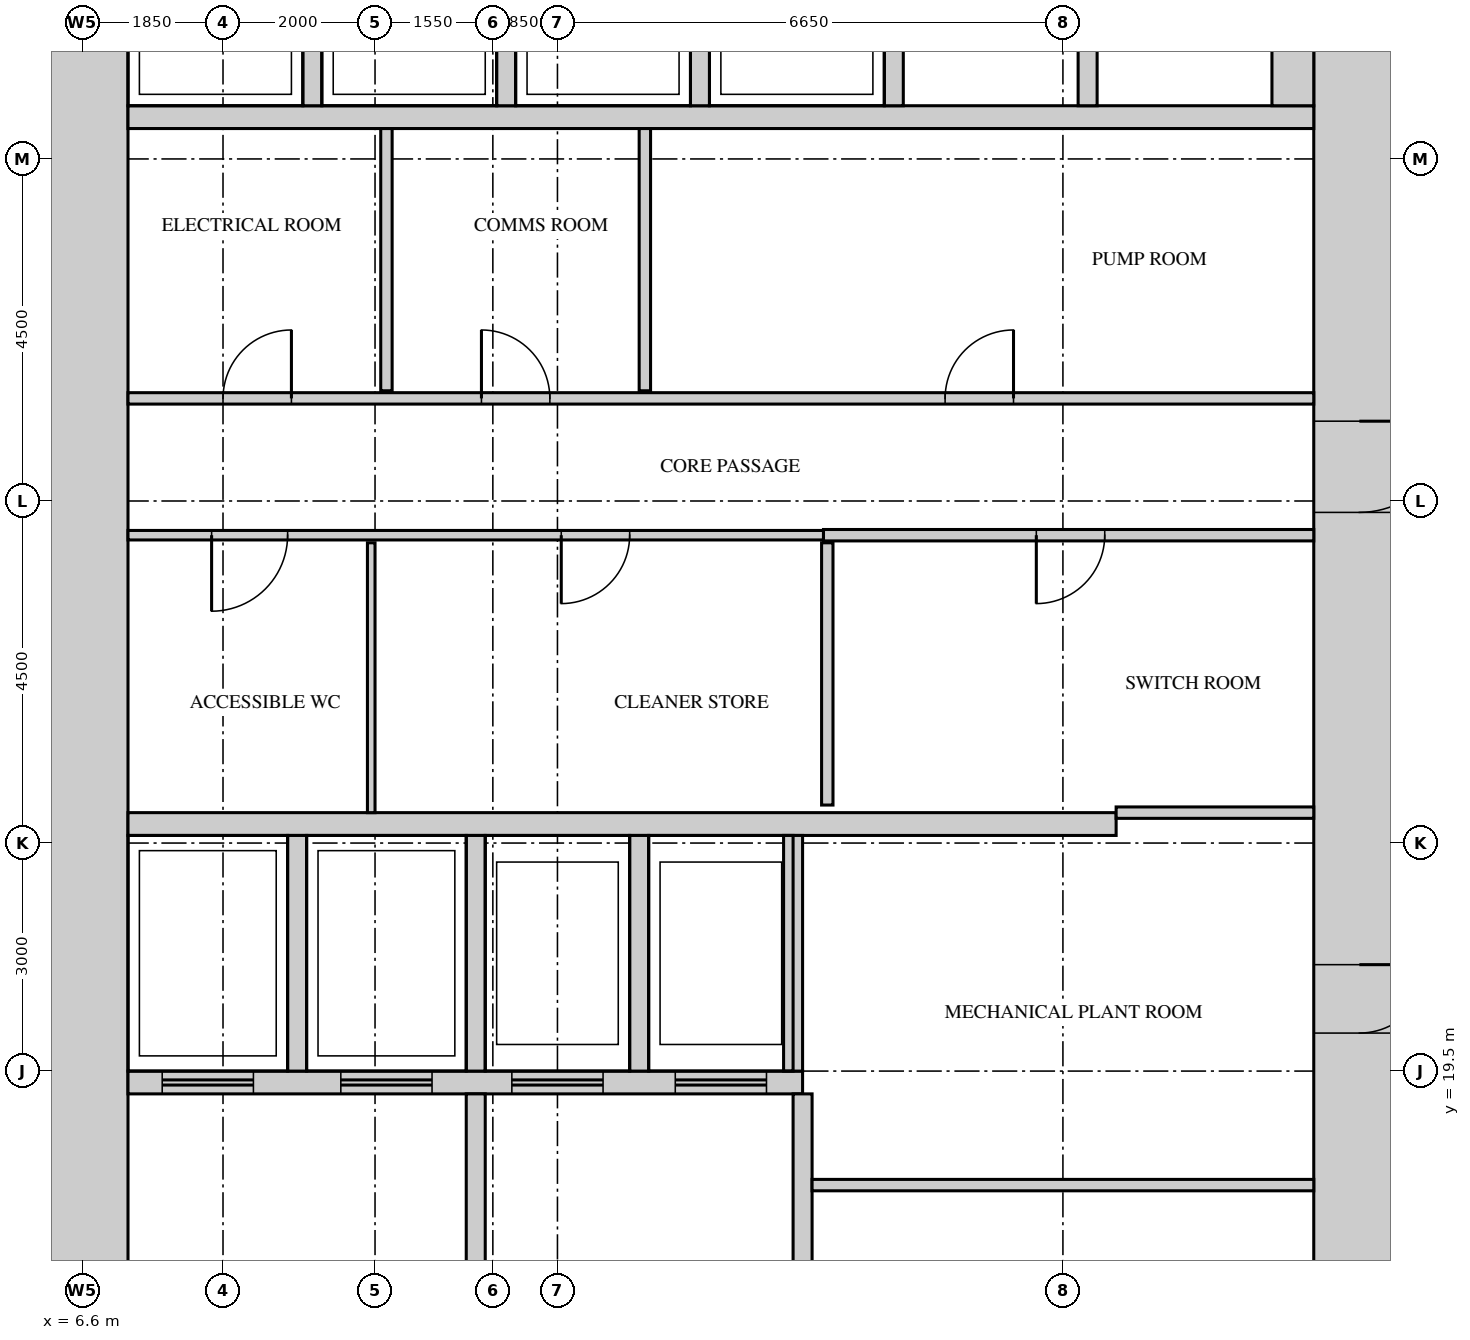
"""IFC4 building model, lengths in metres.
Left out: names, types, materials, properties, quantities, classifications, styles, units other than length and angle.
Written with IfcOpenShell. Run it as: python <this file> out.ifc"""

import sys

from ifc_helpers import new_model, si_unit, direction, frame, frame_2d, origin, place, context, subcontext, project, spatial, rectangle, extrude, source, transform, mapped, element, fill, save


model = new_model("IFC4")
c1 = context("Model", 3, precision=1e-05, world=origin(), true_north=direction((0.0, 1.0)))
c2 = subcontext(c1, "Body", "Model", "MODEL_VIEW")
j1 = project(units=[si_unit("LENGTHUNIT", "METRE"), si_unit("PLANEANGLEUNIT", "RADIAN")], contexts=[c1])
p1 = place(None, origin())
s1 = spatial("IfcSite", under=j1, at=p1, CompositionType="ELEMENT")
p2 = place(p1, origin())
s2 = spatial("IfcBuilding", under=s1, at=p2, CompositionType="ELEMENT")
p3 = place(p2, frame((0.0, 0.0, 42.0)))
s3 = spatial("IfcBuildingStorey", under=s2, at=p3, CompositionType="ELEMENT", Elevation=42.0)
m1 = source(origin(), c2, "Body", "SweptSolid", [
    extrude(rectangle(XDim=27.6, YDim=1.2, at=frame_2d((13.8, 0.0))), origin(), (0.0, 0.0, 1.0), 4.2),
])
p4 = place(p3, frame((23.4, 13.2, 0.0), z_axis=(0.0, 0.0, 1.0), x_axis=(0.0, 1.0, 0.0)))
e1 = element("IfcWall", 1, at=p4, inside=s3, PredefinedType="SHEAR", context=c2, shape_type="MappedRepresentation", body=[
    mapped(m1, transform((0.0, 0.0, 0.0))),
])
m2 = source(origin(), c2, "Body", "SweptSolid", [
    extrude(rectangle(XDim=1.8, YDim=2.1, at=frame_2d((0.9, 1.05))), frame((0.0, 0.61, 0.0), z_axis=(0.0, -1.0, 0.0), x_axis=(1.0, 0.0, 0.0)), (0.0, 0.0, 1.0), 1.22),
])
p5 = place(p4, frame((22.4, 0.0, 0.0)))
e2 = element("IfcOpeningElement", 2, at=p5, cuts=e1, PredefinedType="OPENING", context=c2, shape_type="MappedRepresentation", body=[
    mapped(m2, transform((0.0, 0.0, 0.0))),
])
m3 = source(origin(), c2, "Body", "SweptSolid", [
    extrude(rectangle(XDim=1.2, YDim=2.1, at=frame_2d((0.6, 1.05))), frame((0.0, 0.61, 0.0), z_axis=(0.0, -1.0, 0.0), x_axis=(1.0, 0.0, 0.0)), (0.0, 0.0, 1.0), 1.22),
])
p6 = place(p4, frame((13.65, 0.0, 0.0)))
e3 = element("IfcOpeningElement", 3, at=p6, cuts=e1, PredefinedType="OPENING", context=c2, shape_type="MappedRepresentation", body=[
    mapped(m3, transform((0.0, 0.0, 0.0))),
])
m4 = source(origin(), c2, "Body", "SweptSolid", [
    extrude(rectangle(XDim=0.9, YDim=2.1, at=frame_2d((0.45, 1.05))), frame((0.0, 0.61, 0.0), z_axis=(0.0, -1.0, 0.0), x_axis=(1.0, 0.0, 0.0)), (0.0, 0.0, 1.0), 1.22),
])
p7 = place(p4, frame((1.95, 0.0, 0.0)))
e4 = element("IfcOpeningElement", 4, at=p7, cuts=e1, PredefinedType="OPENING", context=c2, shape_type="MappedRepresentation", body=[
    mapped(m4, transform((0.0, 0.0, 0.0))),
])
p8 = place(p4, frame((6.8, 0.0, 0.0)))
e5 = element("IfcOpeningElement", 5, at=p8, cuts=e1, PredefinedType="OPENING", context=c2, shape_type="MappedRepresentation", body=[
    mapped(m4, transform((0.0, 0.0, 0.0))),
])
p9 = place(p3, frame((6.6, 13.2, 0.0), z_axis=(0.0, 0.0, 1.0), x_axis=(0.0, 1.0, 0.0)))
e6 = element("IfcWall", 6, at=p9, inside=s3, PredefinedType="SHEAR", context=c2, shape_type="MappedRepresentation", body=[
    mapped(m1, transform((0.0, 0.0, 0.0))),
])
m5 = source(origin(), c2, "Body", "SweptSolid", [
    extrude(rectangle(XDim=13.0, YDim=0.3, at=frame_2d((6.5, 0.0))), origin(), (0.0, 0.0, 1.0), 4.2),
])
p10 = place(p3, frame((7.2, 22.75, 0.0), z_axis=(0.0, 0.0, 1.0), x_axis=(1.0, 0.0, 0.0)))
e7 = element("IfcWall", 7, at=p10, inside=s3, PredefinedType="STANDARD", context=c2, shape_type="MappedRepresentation", body=[
    mapped(m5, transform((0.0, 0.0, 0.0))),
])
m6 = source(origin(), c2, "Body", "SweptSolid", [
    extrude(rectangle(XDim=8.875, YDim=0.3, at=frame_2d((4.438, 0.0))), origin(), (0.0, 0.0, 1.0), 4.2),
])
p11 = place(p3, frame((7.2, 19.35, 0.0), z_axis=(0.0, 0.0, 1.0), x_axis=(1.0, 0.0, 0.0)))
e8 = element("IfcWall", 8, at=p11, inside=s3, PredefinedType="STANDARD", context=c2, shape_type="MappedRepresentation", body=[
    mapped(m6, transform((0.0, 0.0, 0.0))),
])
m7 = source(origin(), c2, "Body", "SweptSolid", [
    extrude(rectangle(XDim=1.2, YDim=2.1, at=frame_2d((0.6, 1.05))), frame((0.0, 0.16, 0.0), z_axis=(0.0, -1.0, 0.0), x_axis=(1.0, 0.0, 0.0)), (0.0, 0.0, 1.0), 0.32),
])
p12 = place(p11, frame((0.45, 0.0, 0.0)))
e9 = element("IfcOpeningElement", 9, at=p12, cuts=e8, PredefinedType="OPENING", context=c2, shape_type="MappedRepresentation", body=[
    mapped(m7, transform((0.0, 0.0, 0.0))),
])
p13 = place(p11, frame((2.8, 0.0, 0.0)))
e10 = element("IfcOpeningElement", 10, at=p13, cuts=e8, PredefinedType="OPENING", context=c2, shape_type="MappedRepresentation", body=[
    mapped(m7, transform((0.0, 0.0, 0.0))),
])
p14 = place(p11, frame((5.05, 0.0, 0.0)))
e11 = element("IfcOpeningElement", 11, at=p14, cuts=e8, PredefinedType="OPENING", context=c2, shape_type="MappedRepresentation", body=[
    mapped(m7, transform((0.0, 0.0, 0.0))),
])
p15 = place(p11, frame((7.2, 0.0, 0.0)))
e12 = element("IfcOpeningElement", 12, at=p15, cuts=e8, PredefinedType="OPENING", context=c2, shape_type="MappedRepresentation", body=[
    mapped(m7, transform((0.0, 0.0, 0.0))),
])
m8 = source(origin(), c2, "Body", "SweptSolid", [
    extrude(rectangle(XDim=15.6, YDim=0.3, at=frame_2d((7.8, 0.0))), origin(), (0.0, 0.0, 1.0), 4.2),
])
p16 = place(p3, frame((7.2, 32.05, 0.0), z_axis=(0.0, 0.0, 1.0), x_axis=(1.0, 0.0, 0.0)))
e13 = element("IfcWall", 13, at=p16, inside=s3, PredefinedType="STANDARD", context=c2, shape_type="MappedRepresentation", body=[
    mapped(m8, transform((0.0, 0.0, 0.0))),
])
m9 = source(origin(), c2, "Body", "SweptSolid", [
    extrude(rectangle(XDim=3.1, YDim=0.25, at=frame_2d((1.55, 0.0))), origin(), (0.0, 0.0, 1.0), 4.2),
])
for number, where, z_axis, x_axis in (
    (14, (9.425, 19.5, 0.0), (0.0, 0.0, 1.0), (0.0, 1.0, 0.0)),
    (15, (11.775, 19.5, 0.0), (0.0, 0.0, 1.0), (0.0, 1.0, 0.0)),
    (16, (13.925, 19.5, 0.0), (0.0, 0.0, 1.0), (0.0, 1.0, 0.0)),
    (17, (15.95, 19.5, 0.0), (0.0, 0.0, 1.0), (0.0, 1.0, 0.0)),
):
    element("IfcWall", number, at=place(p3, frame(where, z_axis=z_axis, x_axis=x_axis)), inside=s3, PredefinedType="STANDARD", context=c2, shape_type="MappedRepresentation", body=[
        mapped(m9, transform((0.0, 0.0, 0.0))),
    ])
m10 = source(origin(), c2, "Body", "SweptSolid", [
    extrude(rectangle(XDim=2.4, YDim=0.25, at=frame_2d((1.2, 0.0))), origin(), (0.0, 0.0, 1.0), 4.2),
])
for number, where, z_axis, x_axis in (
    (18, (9.625, 32.2, 0.0), (0.0, 0.0, 1.0), (0.0, 1.0, 0.0)),
    (19, (12.175, 32.2, 0.0), (0.0, 0.0, 1.0), (0.0, 1.0, 0.0)),
    (20, (14.725, 32.2, 0.0), (0.0, 0.0, 1.0), (0.0, 1.0, 0.0)),
    (21, (17.275, 32.2, 0.0), (0.0, 0.0, 1.0), (0.0, 1.0, 0.0)),
    (22, (19.825, 32.2, 0.0), (0.0, 0.0, 1.0), (0.0, 1.0, 0.0)),
):
    element("IfcWall", number, at=place(p3, frame(where, z_axis=z_axis, x_axis=x_axis)), inside=s3, PredefinedType="STANDARD", context=c2, shape_type="MappedRepresentation", body=[
        mapped(m10, transform((0.0, 0.0, 0.0))),
    ])
m11 = source(origin(), c2, "Body", "SweptSolid", [
    extrude(rectangle(XDim=2.4, YDim=0.55, at=frame_2d((1.2, 0.0))), origin(), (0.0, 0.0, 1.0), 4.2),
])
p17 = place(p3, frame((22.525, 32.2, 0.0), z_axis=(0.0, 0.0, 1.0), x_axis=(0.0, 1.0, 0.0)))
e23 = element("IfcWall", 23, at=p17, inside=s3, PredefinedType="STANDARD", context=c2, shape_type="MappedRepresentation", body=[
    mapped(m11, transform((0.0, 0.0, 0.0))),
])
m12 = source(origin(), c2, "Body", "SweptSolid", [
    extrude(rectangle(XDim=3.4, YDim=0.25, at=frame_2d((1.7, 0.0))), origin(), (0.0, 0.0, 1.0), 4.2),
])
for number, where, z_axis, x_axis in (
    (24, (16.075, 15.8, 0.0), (0.0, 0.0, 1.0), (0.0, 1.0, 0.0)),
    (25, (11.775, 15.8, 0.0), (0.0, 0.0, 1.0), (0.0, 1.0, 0.0)),
):
    element("IfcWall", number, at=place(p3, frame(where, z_axis=z_axis, x_axis=x_axis)), inside=s3, PredefinedType="STANDARD", context=c2, shape_type="MappedRepresentation", body=[
        mapped(m12, transform((0.0, 0.0, 0.0))),
    ])
m13 = source(origin(), c2, "Body", "SweptSolid", [
    extrude(rectangle(XDim=6.6, YDim=0.15, at=frame_2d((3.3, 0.0))), origin(), (0.0, 0.0, 1.0), 4.3),
])
p18 = place(p3, frame((16.2, 18.0, 0.0), z_axis=(0.0, 0.0, 1.0), x_axis=(1.0, 0.0, 0.0)))
e26 = element("IfcWall", 26, at=p18, inside=s3, PredefinedType="PARTITIONING", context=c2, shape_type="MappedRepresentation", body=[
    mapped(m13, transform((0.0, 0.0, 0.0))),
])
m14 = source(origin(), c2, "Body", "SweptSolid", [
    extrude(rectangle(XDim=3.55, YDim=0.1, at=frame_2d((1.775, 0.0))), origin(), (0.0, 0.0, 1.0), 4.3),
])
p19 = place(p3, frame((10.4, 22.9, 0.0), z_axis=(0.0, 0.0, 1.0), x_axis=(0.0, 1.0, 0.0)))
e27 = element("IfcWall", 27, at=p19, inside=s3, PredefinedType="PARTITIONING", context=c2, shape_type="MappedRepresentation", body=[
    mapped(m14, transform((0.0, 0.0, 0.0))),
])
m15 = source(origin(), c2, "Body", "SweptSolid", [
    extrude(rectangle(XDim=2.6, YDim=0.15, at=frame_2d((1.3, 0.0))), origin(), (0.0, 0.0, 1.0), 4.3),
])
p20 = place(p3, frame((20.2, 22.9, 0.0), z_axis=(0.0, 0.0, 1.0), x_axis=(1.0, 0.0, 0.0)))
e28 = element("IfcWall", 28, at=p20, inside=s3, PredefinedType="PARTITIONING", context=c2, shape_type="MappedRepresentation", body=[
    mapped(m15, transform((0.0, 0.0, 0.0))),
])
m16 = source(origin(), c2, "Body", "SweptSolid", [
    extrude(rectangle(XDim=3.45, YDim=0.15, at=frame_2d((1.725, 0.0))), origin(), (0.0, 0.0, 1.0), 4.3),
])
p21 = place(p3, frame((16.4, 23.0, 0.0), z_axis=(0.0, 0.0, 1.0), x_axis=(0.0, 1.0, 0.0)))
e29 = element("IfcWall", 29, at=p21, inside=s3, PredefinedType="PARTITIONING", context=c2, shape_type="MappedRepresentation", body=[
    mapped(m16, transform((0.0, 0.0, 0.0))),
])
m17 = source(origin(), c2, "Body", "SweptSolid", [
    extrude(rectangle(XDim=9.15, YDim=0.125, at=frame_2d((4.575, 0.0))), origin(), (0.0, 0.0, 1.0), 4.3),
])
p22 = place(p3, frame((7.2, 26.55, 0.0), z_axis=(0.0, 0.0, 1.0), x_axis=(1.0, 0.0, 0.0)))
e30 = element("IfcWall", 30, at=p22, inside=s3, PredefinedType="PARTITIONING", context=c2, shape_type="MappedRepresentation", body=[
    mapped(m17, transform((0.0, 0.0, 0.0))),
])
m18 = source(origin(), c2, "Body", "SweptSolid", [
    extrude(rectangle(XDim=1.0, YDim=2.1, at=frame_2d((0.5, 1.05))), frame((0.0, 0.073, 0.0), z_axis=(0.0, -1.0, 0.0), x_axis=(1.0, 0.0, 0.0)), (0.0, 0.0, 1.0), 0.145),
])
p23 = place(p22, frame((1.1, 0.0, 0.0)))
e31 = element("IfcOpeningElement", 31, at=p23, cuts=e30, PredefinedType="OPENING", context=c2, shape_type="MappedRepresentation", body=[
    mapped(m18, transform((0.0, 0.0, 0.0))),
])
m19 = source(origin(), c2, "Body", "SweptSolid", [
    extrude(rectangle(XDim=0.9, YDim=2.1, at=frame_2d((0.45, 1.05))), frame((0.0, 0.073, 0.0), z_axis=(0.0, -1.0, 0.0), x_axis=(1.0, 0.0, 0.0)), (0.0, 0.0, 1.0), 0.145),
])
p24 = place(p22, frame((5.7, 0.0, 0.0)))
e32 = element("IfcOpeningElement", 32, at=p24, cuts=e30, PredefinedType="OPENING", context=c2, shape_type="MappedRepresentation", body=[
    mapped(m19, transform((0.0, 0.0, 0.0))),
])
m20 = source(origin(), c2, "Body", "SweptSolid", [
    extrude(rectangle(XDim=6.45, YDim=0.15, at=frame_2d((3.225, 0.0))), origin(), (0.0, 0.0, 1.0), 4.3),
])
p25 = place(p3, frame((16.35, 26.55, 0.0), z_axis=(0.0, 0.0, 1.0), x_axis=(1.0, 0.0, 0.0)))
e33 = element("IfcWall", 33, at=p25, inside=s3, PredefinedType="PARTITIONING", context=c2, shape_type="MappedRepresentation", body=[
    mapped(m20, transform((0.0, 0.0, 0.0))),
])
m21 = source(origin(), c2, "Body", "SweptSolid", [
    extrude(rectangle(XDim=0.9, YDim=2.1, at=frame_2d((0.45, 1.05))), frame((0.0, 0.085, 0.0), z_axis=(0.0, -1.0, 0.0), x_axis=(1.0, 0.0, 0.0)), (0.0, 0.0, 1.0), 0.17),
])
p26 = place(p25, frame((2.8, 0.0, 0.0)))
e34 = element("IfcOpeningElement", 34, at=p26, cuts=e33, PredefinedType="OPENING", context=c2, shape_type="MappedRepresentation", body=[
    mapped(m21, transform((0.0, 0.0, 0.0))),
])
m22 = source(origin(), c2, "Body", "SweptSolid", [
    extrude(rectangle(XDim=15.6, YDim=0.15, at=frame_2d((7.8, 0.0))), origin(), (0.0, 0.0, 1.0), 4.3),
])
p27 = place(p3, frame((7.2, 28.35, 0.0), z_axis=(0.0, 0.0, 1.0), x_axis=(1.0, 0.0, 0.0)))
e35 = element("IfcWall", 35, at=p27, inside=s3, PredefinedType="PARTITIONING", context=c2, shape_type="MappedRepresentation", body=[
    mapped(m22, transform((0.0, 0.0, 0.0))),
])
p28 = place(p27, frame((1.25, 0.0, 0.0)))
e36 = element("IfcOpeningElement", 36, at=p28, cuts=e35, PredefinedType="OPENING", context=c2, shape_type="MappedRepresentation", body=[
    mapped(m21, transform((0.0, 0.0, 0.0))),
])
p29 = place(p27, frame((4.65, 0.0, 0.0)))
e37 = element("IfcOpeningElement", 37, at=p29, cuts=e35, PredefinedType="OPENING", context=c2, shape_type="MappedRepresentation", body=[
    mapped(m21, transform((0.0, 0.0, 0.0))),
])
p30 = place(p27, frame((10.75, 0.0, 0.0)))
e38 = element("IfcOpeningElement", 38, at=p30, cuts=e35, PredefinedType="OPENING", context=c2, shape_type="MappedRepresentation", body=[
    mapped(m21, transform((0.0, 0.0, 0.0))),
])
for number, where, z_axis, x_axis in (
    (39, (10.6, 28.45, 0.0), (0.0, 0.0, 1.0), (0.0, 1.0, 0.0)),
    (40, (14.0, 28.45, 0.0), (0.0, 0.0, 1.0), (0.0, 1.0, 0.0)),
):
    element("IfcWall", number, at=place(p3, frame(where, z_axis=z_axis, x_axis=x_axis)), inside=s3, PredefinedType="PARTITIONING", context=c2, shape_type="MappedRepresentation", body=[
        mapped(m16, transform((0.0, 0.0, 0.0))),
    ])
m23 = source(origin(), c2, "Body", "SweptSolid", [
    extrude(rectangle(XDim=1.2, YDim=2.1, at=frame_2d((0.6, 1.05))), frame((0.0, 0.55, 0.0), z_axis=(0.0, -1.0, 0.0), x_axis=(1.0, 0.0, 0.0)), (0.0, 0.0, 1.0), 1.1),
])
p31 = place(p6, origin())
e41 = element("IfcDoor", 41, at=p31, inside=s3, OperationType="SINGLE_SWING_RIGHT", PredefinedType="DOOR", context=c2, shape_type="MappedRepresentation", body=[
    mapped(m23, transform((0.0, 0.0, 0.0))),
])
fill(e3, e41)
m24 = source(origin(), c2, "Body", "SweptSolid", [
    extrude(rectangle(XDim=0.9, YDim=2.1, at=frame_2d((0.45, 1.05))), frame((0.0, 0.025, 0.0), z_axis=(0.0, -1.0, 0.0), x_axis=(1.0, 0.0, 0.0)), (0.0, 0.0, 1.0), 0.05),
])
p32 = place(p28, origin())
e42 = element("IfcDoor", 42, at=p32, inside=s3, OperationType="SINGLE_SWING_LEFT", PredefinedType="DOOR", context=c2, shape_type="MappedRepresentation", body=[
    mapped(m24, transform((0.0, 0.0, 0.0))),
])
fill(e36, e42)
p33 = place(p29, origin())
e43 = element("IfcDoor", 43, at=p33, inside=s3, OperationType="SINGLE_SWING_RIGHT", PredefinedType="DOOR", context=c2, shape_type="MappedRepresentation", body=[
    mapped(m24, transform((0.0, 0.0, 0.0))),
])
fill(e37, e43)
p34 = place(p30, origin())
e44 = element("IfcDoor", 44, at=p34, inside=s3, OperationType="SINGLE_SWING_LEFT", PredefinedType="DOOR", context=c2, shape_type="MappedRepresentation", body=[
    mapped(m24, transform((0.0, 0.0, 0.0))),
])
fill(e38, e44)
m25 = source(origin(), c2, "Body", "SweptSolid", [
    extrude(rectangle(XDim=1.0, YDim=2.1, at=frame_2d((0.5, 1.05))), frame((0.0, 0.025, 0.0), z_axis=(0.0, -1.0, 0.0), x_axis=(1.0, 0.0, 0.0)), (0.0, 0.0, 1.0), 0.05),
])
p35 = place(p23, origin())
e45 = element("IfcDoor", 45, at=p35, inside=s3, OperationType="SINGLE_SWING_LEFT", PredefinedType="DOOR", context=c2, shape_type="MappedRepresentation", body=[
    mapped(m25, transform((0.0, 0.0, 0.0))),
])
fill(e31, e45)
p36 = place(p24, origin())
e46 = element("IfcDoor", 46, at=p36, inside=s3, OperationType="SINGLE_SWING_LEFT", PredefinedType="DOOR", context=c2, shape_type="MappedRepresentation", body=[
    mapped(m24, transform((0.0, 0.0, 0.0))),
])
fill(e32, e46)
p37 = place(p26, origin())
e47 = element("IfcDoor", 47, at=p37, inside=s3, OperationType="SINGLE_SWING_LEFT", PredefinedType="DOOR", context=c2, shape_type="MappedRepresentation", body=[
    mapped(m24, transform((0.0, 0.0, 0.0))),
])
fill(e34, e47)
m26 = source(origin(), c2, "Body", "SweptSolid", [
    extrude(rectangle(XDim=0.9, YDim=2.1, at=frame_2d((0.45, 1.05))), frame((0.0, 0.55, 0.0), z_axis=(0.0, -1.0, 0.0), x_axis=(1.0, 0.0, 0.0)), (0.0, 0.0, 1.0), 1.1),
])
p38 = place(p8, origin())
e48 = element("IfcDoor", 48, at=p38, inside=s3, OperationType="SINGLE_SWING_RIGHT", PredefinedType="DOOR", context=c2, shape_type="MappedRepresentation", body=[
    mapped(m26, transform((0.0, 0.0, 0.0))),
])
fill(e5, e48)
m27 = source(origin(), c2, "Body", "SweptSolid", [
    extrude(rectangle(XDim=1.2, YDim=2.1, at=frame_2d((0.6, 1.05))), frame((0.0, 0.025, 0.0), z_axis=(0.0, -1.0, 0.0), x_axis=(1.0, 0.0, 0.0)), (0.0, 0.0, 1.0), 0.05),
])
p39 = place(p12, origin())
e49 = element("IfcDoor", 49, at=p39, inside=s3, OperationType="DOUBLE_DOOR_SLIDING", PredefinedType="DOOR", context=c2, shape_type="MappedRepresentation", body=[
    mapped(m27, transform((0.0, 0.0, 0.0))),
])
fill(e9, e49)
p40 = place(p13, origin())
e50 = element("IfcDoor", 50, at=p40, inside=s3, OperationType="DOUBLE_DOOR_SLIDING", PredefinedType="DOOR", context=c2, shape_type="MappedRepresentation", body=[
    mapped(m27, transform((0.0, 0.0, 0.0))),
])
fill(e10, e50)
p41 = place(p14, origin())
e51 = element("IfcDoor", 51, at=p41, inside=s3, OperationType="DOUBLE_DOOR_SLIDING", PredefinedType="DOOR", context=c2, shape_type="MappedRepresentation", body=[
    mapped(m27, transform((0.0, 0.0, 0.0))),
])
fill(e11, e51)
p42 = place(p15, origin())
e52 = element("IfcDoor", 52, at=p42, inside=s3, OperationType="DOUBLE_DOOR_SLIDING", PredefinedType="DOOR", context=c2, shape_type="MappedRepresentation", body=[
    mapped(m27, transform((0.0, 0.0, 0.0))),
])
fill(e12, e52)
save(model, sys.argv[1])
